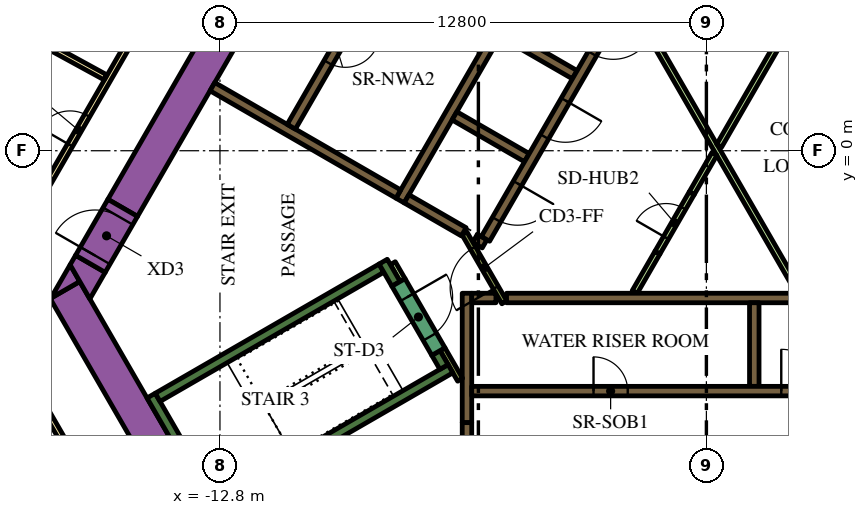
"""IFC4 building model, lengths in metres.
Left out: names, types, materials, properties, quantities, classifications, styles, units other than length and angle.
Written with IfcOpenShell. Run it as: python <this file> out.ifc"""

import sys

from ifc_helpers import new_model, si_unit, direction, frame, frame_2d, origin, place, context, subcontext, project, spatial, polyline, rectangle, outline, extrude, element, fill, save


model = new_model("IFC4")
c1 = context("Model", 3, precision=1e-05, world=origin(), true_north=direction((0.0, 1.0)))
c2 = subcontext(c1, "Body", "Model", "MODEL_VIEW")
j1 = project(units=[si_unit("LENGTHUNIT", "METRE"), si_unit("PLANEANGLEUNIT", "RADIAN")], contexts=[c1])
p1 = place(None, origin())
s1 = spatial("IfcSite", under=j1, at=p1, CompositionType="ELEMENT")
p2 = place(p1, origin())
s2 = spatial("IfcBuilding", under=s1, at=p2, CompositionType="ELEMENT")
p3 = place(p2, frame((0.0, 0.0, 122.7)))
s3 = spatial("IfcBuildingStorey", under=s2, at=p3, CompositionType="ELEMENT", Elevation=122.7)
p4 = place(p3, frame((-15.36, -1.503, 0.0), z_axis=(0.0, 0.0, 1.0), x_axis=(0.50000389221, 0.866023156604, 0.0)))
e1 = element("IfcWall", 1, at=p4, inside=s3, PredefinedType="SOLIDWALL", context=c2, shape_type="SweptSolid", body=[
    extrude(rectangle(XDim=21.0, YDim=0.9, at=frame_2d((10.5, 0.0))), origin(), (0.0, 0.0, 1.0), 3.9),
])
p5 = place(p3, frame((-12.134, -11.883, 0.0), z_axis=(0.0, 0.0, 1.0), x_axis=(-0.500005339912, 0.866022320763, 0.0)))
e2 = element("IfcWall", 2, at=p5, inside=s3, PredefinedType="SOLIDWALL", context=c2, shape_type="SweptSolid", body=[
    extrude(rectangle(XDim=9.488, YDim=0.9, at=frame_2d((4.744, 0.0))), origin(), (0.0, 0.0, 1.0), 3.9),
])
p6 = place(p3, origin())
e3 = element("IfcWall", 3, at=p6, inside=s3, PredefinedType="SOLIDWALL", context=c2, shape_type="SweptSolid", body=[
    extrude(outline(polyline([(-16.489, -3.44), (-17.251, -3.88), (-16.743, -3.0), (-16.489, -3.44)])), origin(), (0.0, 0.0, 1.0), 3.9),
])
e4 = element("IfcWall", 4, at=p6, inside=s3, PredefinedType="SOLIDWALL", context=c2, shape_type="SweptSolid", body=[
    extrude(outline(polyline([(-15.82, -3.201), (-16.223, -3.9), (-16.743, -3.0), (-16.599, -2.751), (-15.82, -3.201)])), origin(), (0.0, 0.0, 1.0), 3.9),
])
p7 = place(p3, frame((-12.885, -9.431, 0.0), z_axis=(0.0, 0.0, 1.0), x_axis=(-0.500020560727, 0.866013532718, 0.0)))
e5 = element("IfcWall", 5, at=p7, inside=s3, PredefinedType="SOLIDWALL", context=c2, shape_type="SweptSolid", body=[
    extrude(rectangle(XDim=3.45, YDim=0.25, at=frame_2d((1.725, 0.0))), origin(), (0.0, 0.0, 1.0), 3.9),
])
p8 = place(p3, frame((-14.44, -6.49, 0.0), z_axis=(0.0, 0.0, 1.0), x_axis=(0.866022966069, 0.500004222222, 0.0)))
e6 = element("IfcWall", 6, at=p8, inside=s3, PredefinedType="SOLIDWALL", context=c2, shape_type="SweptSolid", body=[
    extrude(rectangle(XDim=6.8, YDim=0.25, at=frame_2d((3.4, 0.0))), origin(), (0.0, 0.0, 1.0), 3.9),
])
p9 = place(p3, frame((-8.168, -3.503, 0.0), z_axis=(0.0, 0.0, 1.0), x_axis=(-0.499952099219, 0.866053057547, 0.0)))
e7 = element("IfcWall", 7, at=p9, inside=s3, PredefinedType="SOLIDWALL", context=c2, shape_type="SweptSolid", body=[
    extrude(rectangle(XDim=0.675, YDim=0.25, at=frame_2d((0.337, 0.0))), origin(), (0.0, 0.0, 1.0), 3.9),
])
p10 = place(p3, frame((-12.84, -9.261, 0.0), z_axis=(0.0, 0.0, 1.0), x_axis=(0.866016039709, 0.500016218704, 0.0)))
e8 = element("IfcWall", 8, at=p10, inside=s3, PredefinedType="SOLIDWALL", context=c2, shape_type="SweptSolid", body=[
    extrude(rectangle(XDim=7.05, YDim=0.25, at=frame_2d((3.525, 0.0))), origin(), (0.0, 0.0, 1.0), 3.9),
])
p11 = place(p3, frame((-6.905, -5.69, 0.0), z_axis=(0.0, 0.0, 1.0), x_axis=(-0.500402024738, 0.865793170242, 0.0)))
e9 = element("IfcWall", 9, at=p11, inside=s3, PredefinedType="SOLIDWALL", context=c2, shape_type="SweptSolid", body=[
    extrude(rectangle(XDim=0.425, YDim=0.25, at=frame_2d((0.212, 0.0))), origin(), (0.0, 0.0, 1.0), 3.9),
])
p12 = place(p3, frame((-5.259, -3.875, 0.0), z_axis=(0.0, 0.0, 1.0), x_axis=(1.0, 0.0, 0.0)))
e10 = element("IfcWall", 10, at=p12, inside=s3, PredefinedType="SOLIDWALL", context=c2, shape_type="SweptSolid", body=[
    extrude(rectangle(XDim=10.489, YDim=0.25, at=frame_2d((5.244, 0.0))), origin(), (0.0, 0.0, 1.0), 3.9),
])
p13 = place(p3, frame((1.26, -4.0, 0.0), z_axis=(0.0, 0.0, 1.0), x_axis=(0.0, -1.0, 0.0)))
e11 = element("IfcWall", 11, at=p13, inside=s3, PredefinedType="SOLIDWALL", context=c2, shape_type="SweptSolid", body=[
    extrude(rectangle(XDim=2.2, YDim=0.25, at=frame_2d((1.1, 0.0))), origin(), (0.0, 0.0, 1.0), 3.9),
])
p14 = place(p3, frame((-6.3, -3.75, 0.0), z_axis=(0.0, 0.0, 1.0), x_axis=(0.0, -1.0, 0.0)))
e12 = element("IfcWall", 12, at=p14, inside=s3, PredefinedType="SOLIDWALL", context=c2, shape_type="SweptSolid", body=[
    extrude(rectangle(XDim=3.404, YDim=0.25, at=frame_2d((1.702, 0.0))), origin(), (0.0, 0.0, 1.0), 3.9),
])
p15 = place(p3, frame((-6.175, -3.875, 0.0), z_axis=(0.0, 0.0, 1.0), x_axis=(1.0, 0.0, 0.0)))
e13 = element("IfcWall", 13, at=p15, inside=s3, PredefinedType="SOLIDWALL", context=c2, shape_type="SweptSolid", body=[
    extrude(rectangle(XDim=0.637, YDim=0.25, at=frame_2d((0.318, 0.0))), origin(), (0.0, 0.0, 1.0), 3.9),
])
p16 = place(p3, frame((5.97, -2.591, 0.0), z_axis=(0.0, 0.0, 1.0), x_axis=(-0.499994469932, 0.866028596547, 0.0)))
e14 = element("IfcWall", 14, at=p16, inside=s3, PredefinedType="SOLIDWALL", context=c2, shape_type="SweptSolid", body=[
    extrude(rectangle(XDim=10.488, YDim=0.25, at=frame_2d((5.244, 0.0))), origin(), (0.0, 0.0, 1.0), 3.9),
])
p17 = place(p3, frame((-8.06, -1.311, 0.0), z_axis=(0.0, 0.0, 1.0), x_axis=(0.50000273126, 0.866023826885, 0.0)))
e15 = element("IfcWall", 15, at=p17, inside=s3, PredefinedType="SOLIDWALL", context=c2, shape_type="SweptSolid", body=[
    extrude(rectangle(XDim=10.33, YDim=0.25, at=frame_2d((5.165, 0.0))), origin(), (0.0, 0.0, 1.0), 3.9),
])
for number, where, z_axis, x_axis in (
    (16, (-5.369, 3.1, 0.0), (0.0, 0.0, 1.0), (0.866, -0.5, 0.0)),
    (17, (-4.724, -0.182, 0.0), (0.0, 0.0, 1.0), (-0.866, 0.5, 0.0)),
):
    element("IfcWall", number, at=place(p3, frame(where, z_axis=z_axis, x_axis=x_axis)), inside=s3, PredefinedType="SOLIDWALL", context=c2, shape_type="SweptSolid", body=[
        extrude(rectangle(XDim=2.2, YDim=0.25, at=frame_2d((1.1, 0.0))), origin(), (0.0, 0.0, 1.0), 3.9),
    ])
p18 = place(p3, frame((-6.088, -2.305, 0.0), z_axis=(0.0, 0.0, 1.0), x_axis=(0.866059450854, -0.499941024108, 0.0)))
e18 = element("IfcWall", 18, at=p18, inside=s3, PredefinedType="SOLIDWALL", context=c2, shape_type="SweptSolid", body=[
    extrude(rectangle(XDim=0.29, YDim=0.25, at=frame_2d((0.145, 0.0))), origin(), (0.0, 0.0, 1.0), 3.9),
])
p19 = place(p3, frame((-7.889, -1.265, 0.0), z_axis=(0.0, 0.0, 1.0), x_axis=(0.865986741702, -0.500066958712, 0.0)))
e19 = element("IfcWall", 19, at=p19, inside=s3, PredefinedType="SOLIDWALL", context=c2, shape_type="SweptSolid", body=[
    extrude(rectangle(XDim=1.738, YDim=0.25, at=frame_2d((0.869, 0.0))), origin(), (0.0, 0.0, 1.0), 3.9),
])
p20 = place(p3, frame((-8.106, -1.14, 0.0), z_axis=(0.0, 0.0, 1.0), x_axis=(-0.866000643155, 0.500042884217, 0.0)))
e20 = element("IfcWall", 20, at=p20, inside=s3, PredefinedType="SOLIDWALL", context=c2, shape_type="SweptSolid", body=[
    extrude(rectangle(XDim=5.65, YDim=0.25, at=frame_2d((2.825, 0.0))), origin(), (0.0, 0.0, 1.0), 3.9),
])
p21 = place(p3, frame((-6.48, -6.027, 0.0), z_axis=(0.0, 0.0, 1.0), x_axis=(-0.499927229454, 0.866067413802, 0.0)))
e21 = element("IfcWall", 21, at=p21, inside=s3, PredefinedType="PARTITIONING", context=c2, shape_type="SweptSolid", body=[
    extrude(rectangle(XDim=0.929, YDim=0.15, at=frame_2d((0.464, 0.0))), origin(), (0.0, 0.0, 1.0), 3.9),
])
p22 = place(p3, frame((-1.887, -3.718, 0.0), z_axis=(0.0, 0.0, 1.0), x_axis=(0.500057179532, 0.865992388649, 0.0)))
e22 = element("IfcWall", 22, at=p22, inside=s3, PredefinedType="PARTITIONING", context=c2, shape_type="SweptSolid", body=[
    extrude(rectangle(XDim=1.199, YDim=0.15, at=frame_2d((0.6, 0.0))), origin(), (0.0, 0.0, 1.0), 2.75),
])
p23 = place(p3, frame((-8.252, -2.958, 0.0), z_axis=(0.0, 0.0, 1.0), x_axis=(0.500174715838, -0.865924508047, 0.0)))
e23 = element("IfcWall", 23, at=p23, inside=s3, PredefinedType="PARTITIONING", context=c2, shape_type="SweptSolid", body=[
    extrude(rectangle(XDim=0.514, YDim=0.15, at=frame_2d((0.257, 0.0))), origin(), (0.0, 0.0, 1.0), 2.75),
])
p24 = place(p3, frame((2.435, -3.718, 0.0), z_axis=(0.0, 0.0, 1.0), x_axis=(-0.499985176046, 0.866033962229, 0.0)))
e24 = element("IfcWall", 24, at=p24, inside=s3, PredefinedType="PARTITIONING", context=c2, shape_type="SweptSolid", body=[
    extrude(rectangle(XDim=8.875, YDim=0.15, at=frame_2d((4.438, 0.0))), origin(), (0.0, 0.0, 1.0), 2.75),
])
p25 = place(p3, frame((0.336, 0.132, 0.0), z_axis=(0.0, 0.0, 1.0), x_axis=(0.500001957507, 0.866024273614, 0.0)))
e25 = element("IfcWall", 25, at=p25, inside=s3, PredefinedType="PARTITIONING", context=c2, shape_type="SweptSolid", body=[
    extrude(rectangle(XDim=3.881, YDim=0.15, at=frame_2d((1.941, 0.0))), origin(), (0.0, 0.0, 1.0), 2.75),
])
p26 = place(p3, frame((-0.387, -1.121, 0.0), z_axis=(0.0, 0.0, 1.0), x_axis=(0.500057179532, 0.865992388649, 0.0)))
e26 = element("IfcWall", 26, at=p26, inside=s3, PredefinedType="PARTITIONING", context=c2, shape_type="SweptSolid", body=[
    extrude(rectangle(XDim=1.199, YDim=0.15, at=frame_2d((0.6, 0.0))), origin(), (0.0, 0.0, 1.0), 2.75),
])
p27 = place(p3, frame((-6.175, -6.325, 0.0), z_axis=(0.0, 0.0, 1.0), x_axis=(1.0, 0.0, 0.0)))
e27 = element("IfcWall", 27, at=p27, inside=s3, PredefinedType="SOLIDWALL", context=c2, shape_type="SweptSolid", body=[
    extrude(rectangle(XDim=12.35, YDim=0.25, at=frame_2d((6.175, 0.0))), origin(), (0.0, 0.0, 1.0), 3.9),
])
p28 = place(p27, frame((3.205, 0.0, 0.0)))
e28 = element("IfcOpeningElement", 28, at=p28, cuts=e27, PredefinedType="OPENING", context=c2, shape_type="SweptSolid", body=[
    extrude(rectangle(XDim=0.9, YDim=2.1, at=frame_2d((0.45, 1.05))), frame((0.0, 0.135, 0.0), z_axis=(0.0, -1.0, 0.0), x_axis=(1.0, 0.0, 0.0)), (0.0, 0.0, 1.0), 0.27),
])
p29 = place(p27, frame((8.145, 0.0, 0.0)))
e29 = element("IfcOpeningElement", 29, at=p29, cuts=e27, PredefinedType="OPENING", context=c2, shape_type="SweptSolid", body=[
    extrude(rectangle(XDim=1.1, YDim=2.1, at=frame_2d((0.55, 1.05))), frame((0.0, 0.135, 0.0), z_axis=(0.0, -1.0, 0.0), x_axis=(1.0, 0.0, 0.0)), (0.0, 0.0, 1.0), 0.27),
])
p30 = place(p27, frame((10.665, 0.0, 0.0)))
e30 = element("IfcOpeningElement", 30, at=p30, cuts=e27, PredefinedType="OPENING", context=c2, shape_type="SweptSolid", body=[
    extrude(rectangle(XDim=1.1, YDim=2.1, at=frame_2d((0.55, 1.05))), frame((0.0, 0.135, 0.0), z_axis=(0.0, -1.0, 0.0), x_axis=(1.0, 0.0, 0.0)), (0.0, 0.0, 1.0), 0.27),
])
p31 = place(p3, frame((-6.008, 9.144, 0.0), z_axis=(0.0, 0.0, 1.0), x_axis=(-0.500006956611, -0.866021387346, 0.0)))
e31 = element("IfcWall", 31, at=p31, inside=s3, PredefinedType="SOLIDWALL", context=c2, shape_type="SweptSolid", body=[
    extrude(rectangle(XDim=9.83, YDim=0.25, at=frame_2d((4.915, 0.0))), origin(), (0.0, 0.0, 1.0), 3.9),
])
p32 = place(p31, frame((6.985, 0.0, 0.0)))
e32 = element("IfcOpeningElement", 32, at=p32, cuts=e31, PredefinedType="OPENING", context=c2, shape_type="SweptSolid", body=[
    extrude(rectangle(XDim=0.9, YDim=2.1, at=frame_2d((0.45, 1.05))), frame((0.0, 0.135, 0.0), z_axis=(0.0, -1.0, 0.0), x_axis=(1.0, 0.0, 0.0)), (0.0, 0.0, 1.0), 0.27),
])
p33 = place(p3, frame((-0.898, 6.194, 0.0), z_axis=(0.0, 0.0, 1.0), x_axis=(-0.499996202215, -0.866027596426, 0.0)))
e33 = element("IfcWall", 33, at=p33, inside=s3, PredefinedType="SOLIDWALL", context=c2, shape_type="SweptSolid", body=[
    extrude(rectangle(XDim=9.83, YDim=0.25, at=frame_2d((4.915, 0.0))), origin(), (0.0, 0.0, 1.0), 3.9),
])
p34 = place(p33, frame((0.585, 0.0, 0.0)))
e34 = element("IfcOpeningElement", 34, at=p34, cuts=e33, PredefinedType="OPENING", context=c2, shape_type="SweptSolid", body=[
    extrude(rectangle(XDim=1.1, YDim=2.1, at=frame_2d((0.55, 1.05))), frame((0.0, 0.135, 0.0), z_axis=(0.0, -1.0, 0.0), x_axis=(1.0, 0.0, 0.0)), (0.0, 0.0, 1.0), 0.27),
])
p35 = place(p33, frame((3.105, 0.0, 0.0)))
e35 = element("IfcOpeningElement", 35, at=p35, cuts=e33, PredefinedType="OPENING", context=c2, shape_type="SweptSolid", body=[
    extrude(rectangle(XDim=1.1, YDim=2.1, at=frame_2d((0.55, 1.05))), frame((0.0, 0.135, 0.0), z_axis=(0.0, -1.0, 0.0), x_axis=(1.0, 0.0, 0.0)), (0.0, 0.0, 1.0), 0.27),
])
p36 = place(p33, frame((5.625, 0.0, 0.0)))
e36 = element("IfcOpeningElement", 36, at=p36, cuts=e33, PredefinedType="OPENING", context=c2, shape_type="SweptSolid", body=[
    extrude(rectangle(XDim=1.1, YDim=2.1, at=frame_2d((0.55, 1.05))), frame((0.0, 0.135, 0.0), z_axis=(0.0, -1.0, 0.0), x_axis=(1.0, 0.0, 0.0)), (0.0, 0.0, 1.0), 0.27),
])
p37 = place(p33, frame((8.145, 0.0, 0.0)))
e37 = element("IfcOpeningElement", 37, at=p37, cuts=e33, PredefinedType="OPENING", context=c2, shape_type="SweptSolid", body=[
    extrude(rectangle(XDim=1.1, YDim=2.1, at=frame_2d((0.55, 1.05))), frame((0.0, 0.135, 0.0), z_axis=(0.0, -1.0, 0.0), x_axis=(1.0, 0.0, 0.0)), (0.0, 0.0, 1.0), 0.27),
])
p38 = place(p3, frame((-8.103, -3.466, 0.0), z_axis=(0.0, 0.0, 1.0), x_axis=(0.500078061341, -0.865980330357, 0.0)))
e38 = element("IfcWall", 38, at=p38, inside=s3, PredefinedType="SOLIDWALL", context=c2, shape_type="SweptSolid", body=[
    extrude(rectangle(XDim=2.1, YDim=0.4, at=frame_2d((1.05, 0.0))), origin(), (0.0, 0.0, 1.0), 3.9),
])
p39 = place(p38, frame((0.45, 0.0, 0.0)))
e39 = element("IfcOpeningElement", 39, at=p39, cuts=e38, PredefinedType="OPENING", context=c2, shape_type="SweptSolid", body=[
    extrude(rectangle(XDim=1.2, YDim=2.1, at=frame_2d((0.6, 1.05))), frame((0.0, 0.21, 0.0), z_axis=(0.0, -1.0, 0.0), x_axis=(1.0, 0.0, 0.0)), (0.0, 0.0, 1.0), 0.42),
])
p40 = place(p3, frame((-6.3, -7.154, 0.0), z_axis=(0.0, 0.0, 1.0), x_axis=(0.0, -1.0, 0.0)))
e40 = element("IfcWall", 40, at=p40, inside=s3, PredefinedType="SOLIDWALL", context=c2, shape_type="SweptSolid", body=[
    extrude(rectangle(XDim=1.8, YDim=0.25, at=frame_2d((0.9, 0.0))), origin(), (0.0, 0.0, 1.0), 3.9),
])
p41 = place(p40, frame((0.45, 0.0, 0.0)))
e41 = element("IfcOpeningElement", 41, at=p41, cuts=e40, PredefinedType="OPENING", context=c2, shape_type="SweptSolid", body=[
    extrude(rectangle(XDim=0.9, YDim=2.1, at=frame_2d((0.45, 1.05))), frame((0.0, 0.135, 0.0), z_axis=(0.0, -1.0, 0.0), x_axis=(1.0, 0.0, 0.0)), (0.0, 0.0, 1.0), 0.27),
])
p42 = place(p3, frame((-5.317, -3.99, 0.0), z_axis=(0.0, 0.0, 1.0), x_axis=(-0.500027713859, 0.866009402589, 0.0)))
e42 = element("IfcWall", 42, at=p42, inside=s3, PredefinedType="PARTITIONING", context=c2, shape_type="SweptSolid", body=[
    extrude(rectangle(XDim=2.1, YDim=0.15, at=frame_2d((1.05, 0.0))), origin(), (0.0, 0.0, 1.0), 3.9),
])
p43 = place(p42, frame((0.45, 0.0, 0.0)))
e43 = element("IfcOpeningElement", 43, at=p43, cuts=e42, PredefinedType="OPENING", context=c2, shape_type="SweptSolid", body=[
    extrude(rectangle(XDim=1.2, YDim=2.1, at=frame_2d((0.6, 1.05))), frame((0.0, 0.085, 0.0), z_axis=(0.0, -1.0, 0.0), x_axis=(1.0, 0.0, 0.0)), (0.0, 0.0, 1.0), 0.17),
])
p44 = place(p3, frame((-16.209, -2.976, 0.0), z_axis=(0.0, 0.0, 1.0), x_axis=(0.499954529098, 0.86605165483, 0.0)))
e44 = element("IfcWall", 44, at=p44, inside=s3, PredefinedType="SOLIDWALL", context=c2, shape_type="SweptSolid", body=[
    extrude(rectangle(XDim=1.7, YDim=0.9, at=frame_2d((0.85, 0.0))), origin(), (0.0, 0.0, 1.0), 3.9),
])
p45 = place(p44, frame((0.25, 0.0, 0.0)))
e45 = element("IfcOpeningElement", 45, at=p45, cuts=e44, PredefinedType="OPENING", context=c2, shape_type="SweptSolid", body=[
    extrude(rectangle(XDim=1.2, YDim=2.1, at=frame_2d((0.6, 1.05))), frame((0.0, 0.46, 0.0), z_axis=(0.0, -1.0, 0.0), x_axis=(1.0, 0.0, 0.0)), (0.0, 0.0, 1.0), 0.92),
])
p46 = place(p3, frame((-1.287, -2.679, 0.0), z_axis=(0.0, 0.0, 1.0), x_axis=(0.499961193289, 0.866047807691, 0.0)))
e46 = element("IfcWall", 46, at=p46, inside=s3, PredefinedType="PARTITIONING", context=c2, shape_type="SweptSolid", body=[
    extrude(rectangle(XDim=1.8, YDim=0.15, at=frame_2d((0.9, 0.0))), origin(), (0.0, 0.0, 1.0), 2.75),
])
p47 = place(p46, frame((0.45, 0.0, 0.0)))
e47 = element("IfcOpeningElement", 47, at=p47, cuts=e46, PredefinedType="OPENING", context=c2, shape_type="SweptSolid", body=[
    extrude(rectangle(XDim=0.9, YDim=2.1, at=frame_2d((0.45, 1.05))), frame((0.0, 0.085, 0.0), z_axis=(0.0, -1.0, 0.0), x_axis=(1.0, 0.0, 0.0)), (0.0, 0.0, 1.0), 0.17),
])
p48 = place(p3, frame((-19.081, -3.9, 0.0), z_axis=(0.0, 0.0, 1.0), x_axis=(0.499998313975, 0.866026377209, 0.0)))
e48 = element("IfcWall", 48, at=p48, inside=s3, PredefinedType="PARTITIONING", context=c2, shape_type="SweptSolid", body=[
    extrude(rectangle(XDim=25.766, YDim=0.15, at=frame_2d((12.883, 0.0))), origin(), (0.0, 0.0, 1.0), 2.75),
])
p49 = place(p48, frame((19.306, 0.0, 0.0)))
e49 = element("IfcOpeningElement", 49, at=p49, cuts=e48, PredefinedType="OPENING", context=c2, shape_type="SweptSolid", body=[
    extrude(rectangle(XDim=1.0, YDim=2.1, at=frame_2d((0.5, 1.05))), frame((0.0, 0.085, 0.0), z_axis=(0.0, -1.0, 0.0), x_axis=(1.0, 0.0, 0.0)), (0.0, 0.0, 1.0), 0.17),
])
p50 = place(p48, frame((18.0, 0.0, 0.0)))
e50 = element("IfcOpeningElement", 50, at=p50, cuts=e48, PredefinedType="OPENING", context=c2, shape_type="SweptSolid", body=[
    extrude(rectangle(XDim=1.0, YDim=2.1, at=frame_2d((0.5, 1.05))), frame((0.0, 0.085, 0.0), z_axis=(0.0, -1.0, 0.0), x_axis=(1.0, 0.0, 0.0)), (0.0, 0.0, 1.0), 0.17),
])
p51 = place(p48, frame((7.793, 0.0, 0.0)))
e51 = element("IfcOpeningElement", 51, at=p51, cuts=e48, PredefinedType="OPENING", context=c2, shape_type="SweptSolid", body=[
    extrude(rectangle(XDim=0.9, YDim=2.1, at=frame_2d((0.45, 1.05))), frame((0.0, 0.085, 0.0), z_axis=(0.0, -1.0, 0.0), x_axis=(1.0, 0.0, 0.0)), (0.0, 0.0, 1.0), 0.17),
])
p52 = place(p48, frame((4.674, 0.0, 0.0)))
e52 = element("IfcOpeningElement", 52, at=p52, cuts=e48, PredefinedType="OPENING", context=c2, shape_type="SweptSolid", body=[
    extrude(rectangle(XDim=0.9, YDim=2.1, at=frame_2d((0.45, 1.05))), frame((0.0, 0.085, 0.0), z_axis=(0.0, -1.0, 0.0), x_axis=(1.0, 0.0, 0.0)), (0.0, 0.0, 1.0), 0.17),
])
p53 = place(p48, frame((0.18, 0.0, 0.0)))
e53 = element("IfcOpeningElement", 53, at=p53, cuts=e48, PredefinedType="OPENING", context=c2, shape_type="SweptSolid", body=[
    extrude(rectangle(XDim=1.0, YDim=2.1, at=frame_2d((0.5, 1.05))), frame((0.0, 0.085, 0.0), z_axis=(0.0, -1.0, 0.0), x_axis=(1.0, 0.0, 0.0)), (0.0, 0.0, 1.0), 0.17),
])
p54 = place(p3, frame((-16.412, -8.523, 0.0), z_axis=(0.0, 0.0, 1.0), x_axis=(-0.500001929737, 0.866024289647, 0.0)))
e54 = element("IfcWall", 54, at=p54, inside=s3, PredefinedType="PARTITIONING", context=c2, shape_type="SweptSolid", body=[
    extrude(rectangle(XDim=5.268, YDim=0.15, at=frame_2d((2.634, 0.0))), origin(), (0.0, 0.0, 1.0), 2.75),
])
p55 = place(p3, frame((-26.591, -3.122, 0.0), z_axis=(0.0, 0.0, 1.0), x_axis=(0.893766213273, -0.448533115847, 0.0)))
e55 = element("IfcWall", 55, at=p55, inside=s3, PredefinedType="PARTITIONING", context=c2, shape_type="SweptSolid", body=[
    extrude(rectangle(XDim=10.875, YDim=0.15, at=frame_2d((5.438, 0.0))), origin(), (0.0, 0.0, 1.0), 2.75),
])
p56 = place(p3, frame((-21.614, 5.102, 0.0), z_axis=(0.0, 0.0, 1.0), x_axis=(0.877484555087, -0.479604895287, 0.0)))
e56 = element("IfcWall", 56, at=p56, inside=s3, PredefinedType="PARTITIONING", context=c2, shape_type="SweptSolid", body=[
    extrude(rectangle(XDim=6.611, YDim=0.15, at=frame_2d((3.306, 0.0))), origin(), (0.0, 0.0, 1.0), 2.75),
])
p57 = place(p28, origin())
e57 = element("IfcDoor", 57, at=p57, inside=s3, OperationType="SINGLE_SWING_LEFT", PredefinedType="DOOR", context=c2, shape_type="SweptSolid", body=[
    extrude(rectangle(XDim=0.9, YDim=2.1, at=frame_2d((0.45, 1.05))), frame((0.0, 0.025, 0.0), z_axis=(0.0, -1.0, 0.0), x_axis=(1.0, 0.0, 0.0)), (0.0, 0.0, 1.0), 0.05),
])
fill(e28, e57)
p58 = place(p29, origin())
e58 = element("IfcDoor", 58, at=p58, inside=s3, OperationType="DOUBLE_DOOR_SLIDING", PredefinedType="DOOR", context=c2, shape_type="SweptSolid", body=[
    extrude(rectangle(XDim=1.1, YDim=2.1, at=frame_2d((0.55, 1.05))), frame((0.0, 0.025, 0.0), z_axis=(0.0, -1.0, 0.0), x_axis=(1.0, 0.0, 0.0)), (0.0, 0.0, 1.0), 0.05),
])
fill(e29, e58)
p59 = place(p32, origin())
e59 = element("IfcDoor", 59, at=p59, inside=s3, OperationType="SINGLE_SWING_LEFT", PredefinedType="DOOR", context=c2, shape_type="SweptSolid", body=[
    extrude(rectangle(XDim=0.9, YDim=2.1, at=frame_2d((0.45, 1.05))), frame((0.0, 0.025, 0.0), z_axis=(0.0, -1.0, 0.0), x_axis=(1.0, 0.0, 0.0)), (0.0, 0.0, 1.0), 0.05),
])
fill(e32, e59)
p60 = place(p35, origin())
e60 = element("IfcDoor", 60, at=p60, inside=s3, OperationType="DOUBLE_DOOR_SLIDING", PredefinedType="DOOR", context=c2, shape_type="SweptSolid", body=[
    extrude(rectangle(XDim=1.1, YDim=2.1, at=frame_2d((0.55, 1.05))), frame((0.0, 0.025, 0.0), z_axis=(0.0, -1.0, 0.0), x_axis=(1.0, 0.0, 0.0)), (0.0, 0.0, 1.0), 0.05),
])
fill(e35, e60)
p61 = place(p36, origin())
e61 = element("IfcDoor", 61, at=p61, inside=s3, OperationType="DOUBLE_DOOR_SLIDING", PredefinedType="DOOR", context=c2, shape_type="SweptSolid", body=[
    extrude(rectangle(XDim=1.1, YDim=2.1, at=frame_2d((0.55, 1.05))), frame((0.0, 0.025, 0.0), z_axis=(0.0, -1.0, 0.0), x_axis=(1.0, 0.0, 0.0)), (0.0, 0.0, 1.0), 0.05),
])
fill(e36, e61)
p62 = place(p37, origin())
e62 = element("IfcDoor", 62, at=p62, inside=s3, OperationType="DOUBLE_DOOR_SLIDING", PredefinedType="DOOR", context=c2, shape_type="SweptSolid", body=[
    extrude(rectangle(XDim=1.1, YDim=2.1, at=frame_2d((0.55, 1.05))), frame((0.0, 0.025, 0.0), z_axis=(0.0, -1.0, 0.0), x_axis=(1.0, 0.0, 0.0)), (0.0, 0.0, 1.0), 0.05),
])
fill(e37, e62)
p63 = place(p39, origin())
e63 = element("IfcDoor", 63, at=p63, inside=s3, OperationType="SINGLE_SWING_LEFT", PredefinedType="DOOR", context=c2, shape_type="SweptSolid", body=[
    extrude(rectangle(XDim=1.2, YDim=2.1, at=frame_2d((0.6, 1.05))), frame((0.0, 0.025, 0.0), z_axis=(0.0, -1.0, 0.0), x_axis=(1.0, 0.0, 0.0)), (0.0, 0.0, 1.0), 0.05),
])
fill(e39, e63)
p64 = place(p43, origin())
e64 = element("IfcDoor", 64, at=p64, inside=s3, OperationType="SINGLE_SWING_LEFT", PredefinedType="DOOR", context=c2, shape_type="SweptSolid", body=[
    extrude(rectangle(XDim=1.2, YDim=2.1, at=frame_2d((0.6, 1.05))), frame((0.0, 0.025, 0.0), z_axis=(0.0, -1.0, 0.0), x_axis=(1.0, 0.0, 0.0)), (0.0, 0.0, 1.0), 0.05),
])
fill(e43, e64)
p65 = place(p45, origin())
e65 = element("IfcDoor", 65, at=p65, inside=s3, OperationType="SINGLE_SWING_LEFT", PredefinedType="DOOR", context=c2, shape_type="SweptSolid", body=[
    extrude(rectangle(XDim=1.2, YDim=2.1, at=frame_2d((0.6, 1.05))), frame((0.0, 0.025, 0.0), z_axis=(0.0, -1.0, 0.0), x_axis=(1.0, 0.0, 0.0)), (0.0, 0.0, 1.0), 0.05),
])
fill(e45, e65)
p66 = place(p47, origin())
e66 = element("IfcDoor", 66, at=p66, inside=s3, OperationType="SINGLE_SWING_LEFT", PredefinedType="DOOR", context=c2, shape_type="SweptSolid", body=[
    extrude(rectangle(XDim=0.9, YDim=2.1, at=frame_2d((0.45, 1.05))), frame((0.0, 0.025, 0.0), z_axis=(0.0, -1.0, 0.0), x_axis=(1.0, 0.0, 0.0)), (0.0, 0.0, 1.0), 0.05),
])
fill(e47, e66)
p67 = place(p52, origin())
e67 = element("IfcDoor", 67, at=p67, inside=s3, OperationType="SINGLE_SWING_LEFT", PredefinedType="DOOR", context=c2, shape_type="SweptSolid", body=[
    extrude(rectangle(XDim=0.9, YDim=2.1, at=frame_2d((0.45, 1.05))), frame((0.0, 0.025, 0.0), z_axis=(0.0, -1.0, 0.0), x_axis=(1.0, 0.0, 0.0)), (0.0, 0.0, 1.0), 0.05),
])
fill(e52, e67)
save(model, sys.argv[1])
